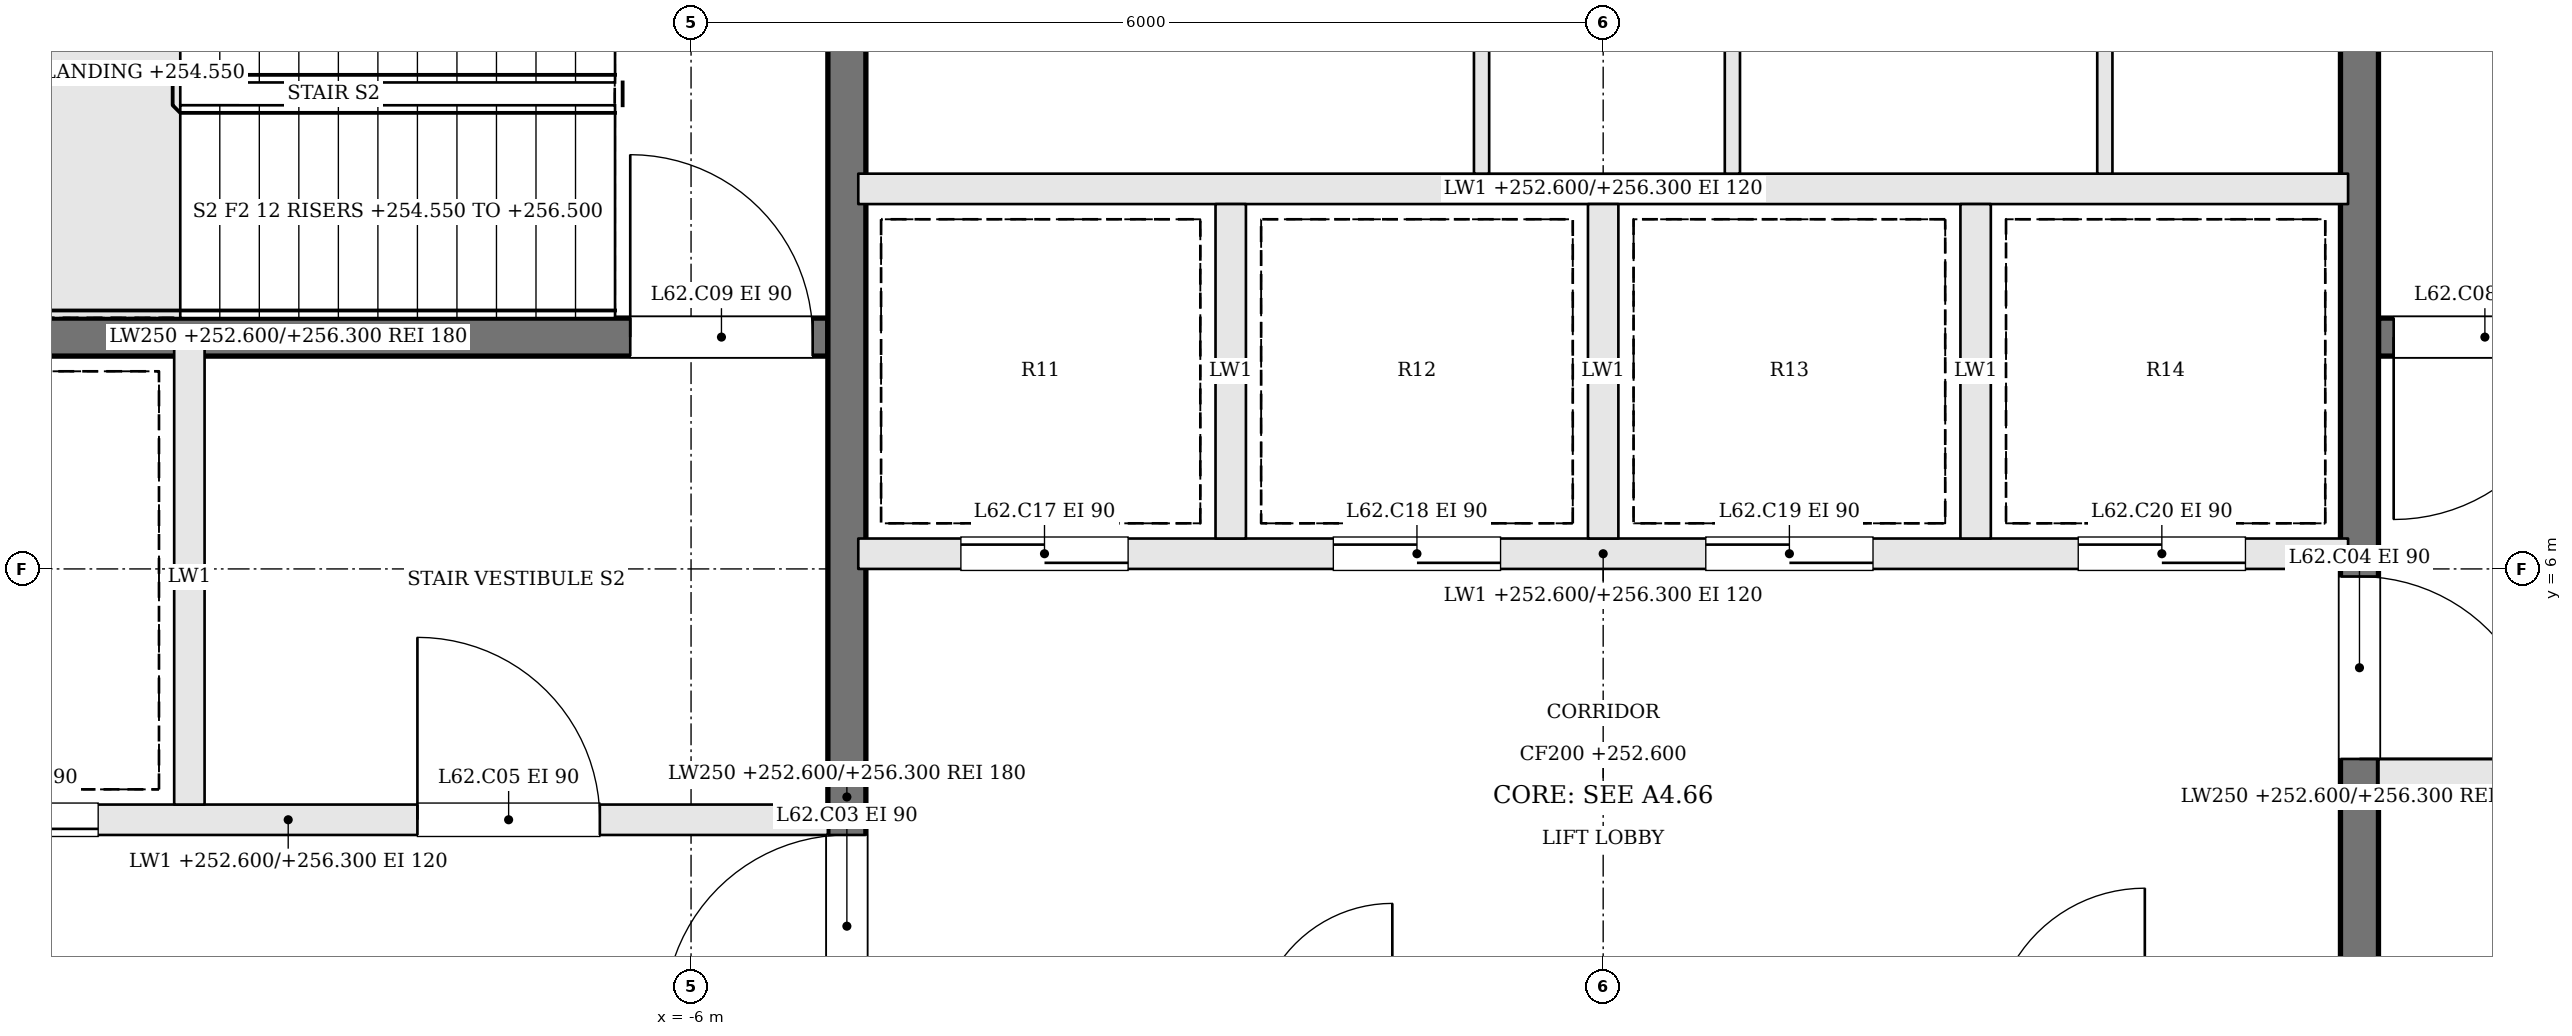
"""IFC4 building model, lengths in metres.
Left out: names, types, materials, properties, quantities, classifications, styles, units other than length and angle.
Written with IfcOpenShell. Run it as: python <this file> out.ifc"""

import sys

from ifc_helpers import new_model, si_unit, direction, frame, frame_2d, origin, place, context, subcontext, project, spatial, rectangle, extrude, element, fill, save


model = new_model("IFC4")
c1 = context("Model", 3, precision=1e-05, world=origin(), true_north=direction((0.0, 1.0)))
c2 = subcontext(c1, "Body", "Model", "MODEL_VIEW")
j1 = project(units=[si_unit("LENGTHUNIT", "METRE"), si_unit("PLANEANGLEUNIT", "RADIAN")], contexts=[c1])
p1 = place(None, origin())
s1 = spatial("IfcSite", under=j1, at=p1, CompositionType="ELEMENT")
p2 = place(p1, origin())
s2 = spatial("IfcBuilding", under=s1, at=p2, CompositionType="ELEMENT")
p3 = place(p2, frame((0.0, 0.0, 252.6)))
s3 = spatial("IfcBuildingStorey", under=s2, at=p3, CompositionType="ELEMENT", Elevation=252.6)
p4 = place(p3, frame((12.2, 7.525, 0.0), z_axis=(0.0, 0.0, 1.0), x_axis=(-1.0, 0.0, 0.0)))
e1 = element("IfcWall", 1, at=p4, inside=s3, PredefinedType="SOLIDWALL", context=c2, shape_type="SweptSolid", body=[
    extrude(rectangle(XDim=7.1, YDim=0.25, at=frame_2d((3.55, 0.0))), origin(), (0.0, 0.0, 1.0), 3.7),
])
p5 = place(p4, frame((5.8, 0.0, 0.0)))
e2 = element("IfcOpeningElement", 2, at=p5, cuts=e1, PredefinedType="OPENING", context=c2, shape_type="SweptSolid", body=[
    extrude(rectangle(XDim=1.2, YDim=2.1, at=frame_2d((0.6, 1.05))), frame((0.0, 0.135, 0.0), z_axis=(0.0, -1.0, 0.0), x_axis=(1.0, 0.0, 0.0)), (0.0, 0.0, 1.0), 0.27),
])
p6 = place(p3, frame((-12.2, 4.35, 0.0), z_axis=(0.0, 0.0, 1.0), x_axis=(1.0, 0.0, 0.0)))
e3 = element("IfcWall", 3, at=p6, inside=s3, PredefinedType="SOLIDWALL", context=c2, shape_type="SweptSolid", body=[
    extrude(rectangle(XDim=7.1, YDim=0.2, at=frame_2d((3.55, 0.0))), origin(), (0.0, 0.0, 1.0), 3.7),
])
p7 = place(p6, frame((4.4, 0.0, 0.0)))
e4 = element("IfcOpeningElement", 4, at=p7, cuts=e3, PredefinedType="OPENING", context=c2, shape_type="SweptSolid", body=[
    extrude(rectangle(XDim=1.2, YDim=2.1, at=frame_2d((0.6, 1.05))), frame((0.0, 0.11, 0.0), z_axis=(0.0, -1.0, 0.0), x_axis=(1.0, 0.0, 0.0)), (0.0, 0.0, 1.0), 0.22),
])
p8 = place(p6, frame((1.1, 0.0, 0.0)))
e5 = element("IfcOpeningElement", 5, at=p8, cuts=e3, PredefinedType="OPENING", context=c2, shape_type="SweptSolid", body=[
    extrude(rectangle(XDim=1.2, YDim=2.1, at=frame_2d((0.6, 1.05))), frame((0.0, 0.11, 0.0), z_axis=(0.0, -1.0, 0.0), x_axis=(1.0, 0.0, 0.0)), (0.0, 0.0, 1.0), 0.22),
])
p9 = place(p3, frame((12.2, 4.65, 0.0), z_axis=(0.0, 0.0, 1.0), x_axis=(-1.0, 0.0, 0.0)))
e6 = element("IfcWall", 6, at=p9, inside=s3, PredefinedType="SOLIDWALL", context=c2, shape_type="SweptSolid", body=[
    extrude(rectangle(XDim=7.1, YDim=0.2, at=frame_2d((3.55, 0.0))), origin(), (0.0, 0.0, 1.0), 3.7),
])
p10 = place(p9, frame((4.4, 0.0, 0.0)))
e7 = element("IfcOpeningElement", 7, at=p10, cuts=e6, PredefinedType="OPENING", context=c2, shape_type="SweptSolid", body=[
    extrude(rectangle(XDim=1.2, YDim=2.1, at=frame_2d((0.6, 1.05))), frame((0.0, 0.11, 0.0), z_axis=(0.0, -1.0, 0.0), x_axis=(1.0, 0.0, 0.0)), (0.0, 0.0, 1.0), 0.22),
])
p11 = place(p9, frame((1.1, 0.0, 0.0)))
e8 = element("IfcOpeningElement", 8, at=p11, cuts=e6, PredefinedType="OPENING", context=c2, shape_type="SweptSolid", body=[
    extrude(rectangle(XDim=1.2, YDim=2.1, at=frame_2d((0.6, 1.05))), frame((0.0, 0.11, 0.0), z_axis=(0.0, -1.0, 0.0), x_axis=(1.0, 0.0, 0.0)), (0.0, 0.0, 1.0), 0.22),
])
p12 = place(p3, frame((-12.2, 7.525, 0.0), z_axis=(0.0, 0.0, 1.0), x_axis=(1.0, 0.0, 0.0)))
e9 = element("IfcWall", 9, at=p12, inside=s3, PredefinedType="SOLIDWALL", context=c2, shape_type="SweptSolid", body=[
    extrude(rectangle(XDim=7.1, YDim=0.25, at=frame_2d((3.55, 0.0))), origin(), (0.0, 0.0, 1.0), 3.7),
])
p13 = place(p12, frame((5.8, 0.0, 0.0)))
e10 = element("IfcOpeningElement", 10, at=p13, cuts=e9, PredefinedType="OPENING", context=c2, shape_type="SweptSolid", body=[
    extrude(rectangle(XDim=1.2, YDim=2.1, at=frame_2d((0.6, 1.05))), frame((0.0, 0.135, 0.0), z_axis=(0.0, -1.0, 0.0), x_axis=(1.0, 0.0, 0.0)), (0.0, 0.0, 1.0), 0.27),
])
p14 = place(p3, frame((-9.3, 4.45, 0.0), z_axis=(0.0, 0.0, 1.0), x_axis=(0.0, 1.0, 0.0)))
e11 = element("IfcWall", 11, at=p14, inside=s3, PredefinedType="SOLIDWALL", context=c2, shape_type="SweptSolid", body=[
    extrude(rectangle(XDim=3.0, YDim=0.2, at=frame_2d((1.5, 0.0))), origin(), (0.0, 0.0, 1.0), 3.7),
])
p15 = place(p3, frame((-4.975, -2.2, 0.0), z_axis=(0.0, 0.0, 1.0), x_axis=(0.0, 1.0, 0.0)))
e12 = element("IfcWall", 12, at=p15, inside=s3, PredefinedType="SOLIDWALL", context=c2, shape_type="SweptSolid", body=[
    extrude(rectangle(XDim=13.4, YDim=0.25, at=frame_2d((6.7, 0.0))), origin(), (0.0, 0.0, 1.0), 3.7),
])
p16 = place(p15, frame((5.25, 0.0, 0.0)))
e13 = element("IfcOpeningElement", 13, at=p16, cuts=e12, PredefinedType="OPENING", context=c2, shape_type="SweptSolid", body=[
    extrude(rectangle(XDim=1.2, YDim=2.1, at=frame_2d((0.6, 1.05))), frame((0.0, 0.135, 0.0), z_axis=(0.0, -1.0, 0.0), x_axis=(1.0, 0.0, 0.0)), (0.0, 0.0, 1.0), 0.27),
])
p17 = place(p3, frame((4.975, 11.2, 0.0), z_axis=(0.0, 0.0, 1.0), x_axis=(0.0, -1.0, 0.0)))
e14 = element("IfcWall", 14, at=p17, inside=s3, PredefinedType="SOLIDWALL", context=c2, shape_type="SweptSolid", body=[
    extrude(rectangle(XDim=13.4, YDim=0.25, at=frame_2d((6.7, 0.0))), origin(), (0.0, 0.0, 1.0), 3.7),
])
p18 = place(p17, frame((5.25, 0.0, 0.0)))
e15 = element("IfcOpeningElement", 15, at=p18, cuts=e14, PredefinedType="OPENING", context=c2, shape_type="SweptSolid", body=[
    extrude(rectangle(XDim=1.2, YDim=2.1, at=frame_2d((0.6, 1.05))), frame((0.0, 0.135, 0.0), z_axis=(0.0, -1.0, 0.0), x_axis=(1.0, 0.0, 0.0)), (0.0, 0.0, 1.0), 0.27),
])
p19 = place(p3, frame((-4.9, 6.1, 0.0), z_axis=(0.0, 0.0, 1.0), x_axis=(1.0, 0.0, 0.0)))
e16 = element("IfcWall", 16, at=p19, inside=s3, PredefinedType="SOLIDWALL", context=c2, shape_type="SweptSolid", body=[
    extrude(rectangle(XDim=9.8, YDim=0.2, at=frame_2d((4.9, 0.0))), origin(), (0.0, 0.0, 1.0), 3.7),
])
p20 = place(p19, frame((0.675, 0.0, 0.0)))
e17 = element("IfcOpeningElement", 17, at=p20, cuts=e16, PredefinedType="OPENING", context=c2, shape_type="SweptSolid", body=[
    extrude(rectangle(XDim=1.1, YDim=2.1, at=frame_2d((0.55, 1.05))), frame((0.0, 0.11, 0.0), z_axis=(0.0, -1.0, 0.0), x_axis=(1.0, 0.0, 0.0)), (0.0, 0.0, 1.0), 0.22),
])
p21 = place(p19, frame((3.125, 0.0, 0.0)))
e18 = element("IfcOpeningElement", 18, at=p21, cuts=e16, PredefinedType="OPENING", context=c2, shape_type="SweptSolid", body=[
    extrude(rectangle(XDim=1.1, YDim=2.1, at=frame_2d((0.55, 1.05))), frame((0.0, 0.11, 0.0), z_axis=(0.0, -1.0, 0.0), x_axis=(1.0, 0.0, 0.0)), (0.0, 0.0, 1.0), 0.22),
])
p22 = place(p19, frame((5.575, 0.0, 0.0)))
e19 = element("IfcOpeningElement", 19, at=p22, cuts=e16, PredefinedType="OPENING", context=c2, shape_type="SweptSolid", body=[
    extrude(rectangle(XDim=1.1, YDim=2.1, at=frame_2d((0.55, 1.05))), frame((0.0, 0.11, 0.0), z_axis=(0.0, -1.0, 0.0), x_axis=(1.0, 0.0, 0.0)), (0.0, 0.0, 1.0), 0.22),
])
p23 = place(p19, frame((8.025, 0.0, 0.0)))
e20 = element("IfcOpeningElement", 20, at=p23, cuts=e16, PredefinedType="OPENING", context=c2, shape_type="SweptSolid", body=[
    extrude(rectangle(XDim=1.1, YDim=2.1, at=frame_2d((0.55, 1.05))), frame((0.0, 0.11, 0.0), z_axis=(0.0, -1.0, 0.0), x_axis=(1.0, 0.0, 0.0)), (0.0, 0.0, 1.0), 0.22),
])
p24 = place(p3, frame((-4.9, 8.5, 0.0), z_axis=(0.0, 0.0, 1.0), x_axis=(1.0, 0.0, 0.0)))
e21 = element("IfcWall", 21, at=p24, inside=s3, PredefinedType="SOLIDWALL", context=c2, shape_type="SweptSolid", body=[
    extrude(rectangle(XDim=9.8, YDim=0.2, at=frame_2d((4.9, 0.0))), origin(), (0.0, 0.0, 1.0), 3.7),
])
for number, where, z_axis, x_axis in (
    (22, (-2.45, 6.2, 0.0), (0.0, 0.0, 1.0), (0.0, 1.0, 0.0)),
    (23, (0.0, 6.2, 0.0), (0.0, 0.0, 1.0), (0.0, 1.0, 0.0)),
    (24, (2.45, 6.2, 0.0), (0.0, 0.0, 1.0), (0.0, 1.0, 0.0)),
):
    element("IfcWall", number, at=place(p3, frame(where, z_axis=z_axis, x_axis=x_axis)), inside=s3, PredefinedType="SOLIDWALL", context=c2, shape_type="SweptSolid", body=[
        extrude(rectangle(XDim=2.2, YDim=0.2, at=frame_2d((1.1, 0.0))), origin(), (0.0, 0.0, 1.0), 3.7),
    ])
for number, where, z_axis, x_axis in (
    (25, (-0.8, 8.6, 0.0), (0.0, 0.0, 1.0), (0.0, 1.0, 0.0)),
    (26, (0.85, 8.6, 0.0), (0.0, 0.0, 1.0), (0.0, 1.0, 0.0)),
    (27, (3.3, 8.6, 0.0), (0.0, 0.0, 1.0), (0.0, 1.0, 0.0)),
):
    element("IfcWall", number, at=place(p3, frame(where, z_axis=z_axis, x_axis=x_axis)), inside=s3, PredefinedType="PARTITIONING", context=c2, shape_type="SweptSolid", body=[
        extrude(rectangle(XDim=2.6, YDim=0.1, at=frame_2d((1.3, 0.0))), origin(), (0.0, 0.0, 1.0), 3.7),
    ])
p25 = place(p16, origin())
e28 = element("IfcDoor", 28, at=p25, inside=s3, OperationType="SINGLE_SWING_LEFT", PredefinedType="DOOR", context=c2, shape_type="SweptSolid", body=[
    extrude(rectangle(XDim=1.2, YDim=2.1, at=frame_2d((0.6, 1.05))), frame((0.0, 0.025, 0.0), z_axis=(0.0, -1.0, 0.0), x_axis=(1.0, 0.0, 0.0)), (0.0, 0.0, 1.0), 0.05),
])
fill(e13, e28)
p26 = place(p18, origin())
e29 = element("IfcDoor", 29, at=p26, inside=s3, OperationType="SINGLE_SWING_RIGHT", PredefinedType="DOOR", context=c2, shape_type="SweptSolid", body=[
    extrude(rectangle(XDim=1.2, YDim=2.1, at=frame_2d((0.6, 1.05))), frame((0.0, 0.025, 0.0), z_axis=(0.0, -1.0, 0.0), x_axis=(1.0, 0.0, 0.0)), (0.0, 0.0, 1.0), 0.05),
])
fill(e15, e29)
p27 = place(p7, origin())
e30 = element("IfcDoor", 30, at=p27, inside=s3, OperationType="SINGLE_SWING_LEFT", PredefinedType="DOOR", context=c2, shape_type="SweptSolid", body=[
    extrude(rectangle(XDim=1.2, YDim=2.1, at=frame_2d((0.6, 1.05))), frame((0.0, 0.025, 0.0), z_axis=(0.0, -1.0, 0.0), x_axis=(1.0, 0.0, 0.0)), (0.0, 0.0, 1.0), 0.05),
])
fill(e4, e30)
p28 = place(p5, origin())
e31 = element("IfcDoor", 31, at=p28, inside=s3, OperationType="SINGLE_SWING_RIGHT", PredefinedType="DOOR", context=c2, shape_type="SweptSolid", body=[
    extrude(rectangle(XDim=1.2, YDim=2.1, at=frame_2d((0.6, 1.05))), frame((0.0, 0.025, 0.0), z_axis=(0.0, -1.0, 0.0), x_axis=(1.0, 0.0, 0.0)), (0.0, 0.0, 1.0), 0.05),
])
fill(e2, e31)
p29 = place(p13, origin())
e32 = element("IfcDoor", 32, at=p29, inside=s3, OperationType="SINGLE_SWING_LEFT", PredefinedType="DOOR", context=c2, shape_type="SweptSolid", body=[
    extrude(rectangle(XDim=1.2, YDim=2.1, at=frame_2d((0.6, 1.05))), frame((0.0, 0.025, 0.0), z_axis=(0.0, -1.0, 0.0), x_axis=(1.0, 0.0, 0.0)), (0.0, 0.0, 1.0), 0.05),
])
fill(e10, e32)
p30 = place(p8, origin())
e33 = element("IfcDoor", 33, at=p30, inside=s3, OperationType="SLIDING_TO_RIGHT", PredefinedType="DOOR", context=c2, shape_type="SweptSolid", body=[
    extrude(rectangle(XDim=1.2, YDim=2.1, at=frame_2d((0.6, 1.05))), frame((0.0, 0.025, 0.0), z_axis=(0.0, -1.0, 0.0), x_axis=(1.0, 0.0, 0.0)), (0.0, 0.0, 1.0), 0.05),
])
fill(e5, e33)
p31 = place(p20, origin())
e34 = element("IfcDoor", 34, at=p31, inside=s3, OperationType="SLIDING_TO_RIGHT", PredefinedType="DOOR", context=c2, shape_type="SweptSolid", body=[
    extrude(rectangle(XDim=1.1, YDim=2.1, at=frame_2d((0.55, 1.05))), frame((0.0, 0.025, 0.0), z_axis=(0.0, -1.0, 0.0), x_axis=(1.0, 0.0, 0.0)), (0.0, 0.0, 1.0), 0.05),
])
fill(e17, e34)
p32 = place(p21, origin())
e35 = element("IfcDoor", 35, at=p32, inside=s3, OperationType="SLIDING_TO_LEFT", PredefinedType="DOOR", context=c2, shape_type="SweptSolid", body=[
    extrude(rectangle(XDim=1.1, YDim=2.1, at=frame_2d((0.55, 1.05))), frame((0.0, 0.025, 0.0), z_axis=(0.0, -1.0, 0.0), x_axis=(1.0, 0.0, 0.0)), (0.0, 0.0, 1.0), 0.05),
])
fill(e18, e35)
p33 = place(p22, origin())
e36 = element("IfcDoor", 36, at=p33, inside=s3, OperationType="SLIDING_TO_RIGHT", PredefinedType="DOOR", context=c2, shape_type="SweptSolid", body=[
    extrude(rectangle(XDim=1.1, YDim=2.1, at=frame_2d((0.55, 1.05))), frame((0.0, 0.025, 0.0), z_axis=(0.0, -1.0, 0.0), x_axis=(1.0, 0.0, 0.0)), (0.0, 0.0, 1.0), 0.05),
])
fill(e19, e36)
p34 = place(p23, origin())
e37 = element("IfcDoor", 37, at=p34, inside=s3, OperationType="SLIDING_TO_LEFT", PredefinedType="DOOR", context=c2, shape_type="SweptSolid", body=[
    extrude(rectangle(XDim=1.1, YDim=2.1, at=frame_2d((0.55, 1.05))), frame((0.0, 0.025, 0.0), z_axis=(0.0, -1.0, 0.0), x_axis=(1.0, 0.0, 0.0)), (0.0, 0.0, 1.0), 0.05),
])
fill(e20, e37)
save(model, sys.argv[1])
